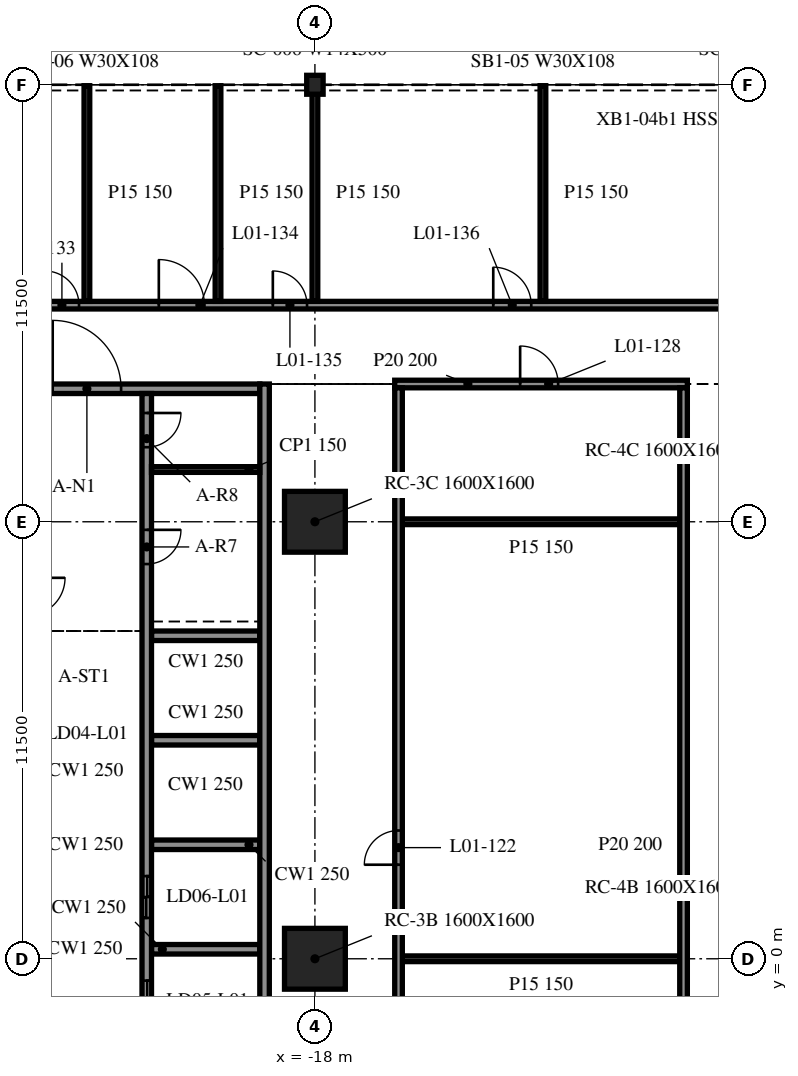
"""IFC4 building model, lengths in metres.
Left out: names, types, materials, properties, quantities, classifications, styles, units other than length and angle.
Written with IfcOpenShell. Run it as: python <this file> out.ifc"""

import sys

from ifc_helpers import new_model, si_unit, direction, frame, frame_2d, origin, origin_2d, place, context, subcontext, project, spatial, rectangle, i_section, extrude, element, fill, save


model = new_model("IFC4")
c1 = context("Model", 3, precision=1e-05, world=origin(), true_north=direction((0.0, 1.0)))
c2 = subcontext(c1, "Body", "Model", "MODEL_VIEW")
j1 = project(units=[si_unit("LENGTHUNIT", "METRE"), si_unit("PLANEANGLEUNIT", "RADIAN")], contexts=[c1])
p1 = place(None, origin())
s1 = spatial("IfcSite", under=j1, at=p1, CompositionType="ELEMENT")
p2 = place(p1, origin())
s2 = spatial("IfcBuilding", under=s1, at=p2, CompositionType="ELEMENT")
p3 = place(p2, frame((0.0, 0.0, 7.2)))
s3 = spatial("IfcBuildingStorey", under=s2, at=p3, CompositionType="ELEMENT", Elevation=7.2)
for number, where, z_axis, x_axis in (
    (1, (-18.0, 0.0, -0.34), (0.0, 0.0, 1.0), (1.0, 0.0, 0.0)),
    (2, (-18.0, 11.5, -0.34), (0.0, 0.0, 1.0), (1.0, 0.0, 0.0)),
):
    element("IfcColumn", number, at=place(p3, frame(where, z_axis=z_axis, x_axis=x_axis)), inside=s3, PredefinedType="COLUMN", context=c2, shape_type="SweptSolid", body=[
        extrude(rectangle(XDim=1.6, YDim=1.6, at=origin_2d()), origin(), (0.0, 0.0, 1.0), 4.3),
    ])
p4 = place(p3, frame((-18.0, 23.0, -0.34), z_axis=(0.0, 0.0, 1.0), x_axis=(1.0, 0.0, 0.0)))
e3 = element("IfcColumn", 3, at=p4, inside=s3, PredefinedType="COLUMN", context=c2, shape_type="SweptSolid", body=[
    extrude(i_section(OverallWidth=0.432, OverallDepth=0.498, WebThickness=0.056, FlangeThickness=0.089, at=origin_2d()), origin(), (0.0, 0.0, 1.0), 4.3),
])
p5 = place(p3, frame((-19.325, -9.125, 0.0), z_axis=(0.0, 0.0, 1.0), x_axis=(0.0, 1.0, 0.0)))
e4 = element("IfcWall", 4, at=p5, inside=s3, PredefinedType="SOLIDWALL", context=c2, shape_type="SweptSolid", body=[
    extrude(rectangle(XDim=24.25, YDim=0.25, at=frame_2d((12.125, 0.0))), origin(), (0.0, 0.0, 1.0), 3.96),
])
p6 = place(p3, frame((-28.55, 15.0, 0.0), z_axis=(0.0, 0.0, 1.0), x_axis=(1.0, 0.0, 0.0)))
e5 = element("IfcWall", 5, at=p6, inside=s3, PredefinedType="SOLIDWALL", context=c2, shape_type="SweptSolid", body=[
    extrude(rectangle(XDim=9.1, YDim=0.25, at=frame_2d((4.55, 0.0))), origin(), (0.0, 0.0, 1.0), 3.96),
])
p7 = place(p6, frame((3.65, 0.0, 0.0)))
e6 = element("IfcOpeningElement", 6, at=p7, cuts=e5, PredefinedType="OPENING", context=c2, shape_type="SweptSolid", body=[
    extrude(rectangle(XDim=1.8, YDim=2.1, at=frame_2d((0.9, 1.05))), frame((0.0, 0.135, 0.0), z_axis=(0.0, -1.0, 0.0), x_axis=(1.0, 0.0, 0.0)), (0.0, 0.0, 1.0), 0.27),
])
p8 = place(p3, frame((-22.425, 14.875, 0.0), z_axis=(0.0, 0.0, 1.0), x_axis=(0.0, -1.0, 0.0)))
e7 = element("IfcWall", 7, at=p8, inside=s3, PredefinedType="SOLIDWALL", context=c2, shape_type="SweptSolid", body=[
    extrude(rectangle(XDim=23.75, YDim=0.25, at=frame_2d((11.875, 0.0))), origin(), (0.0, 0.0, 1.0), 3.96),
])
p9 = place(p8, frame((15.45, 0.0, 0.0)))
e8 = element("IfcOpeningElement", 8, at=p9, cuts=e7, PredefinedType="OPENING", context=c2, shape_type="SweptSolid", body=[
    extrude(rectangle(XDim=1.1, YDim=2.1, at=frame_2d((0.55, 1.05))), frame((0.0, 0.135, 0.0), z_axis=(0.0, -1.0, 0.0), x_axis=(1.0, 0.0, 0.0)), (0.0, 0.0, 1.0), 0.27),
])
p10 = place(p8, frame((12.7, 0.0, 0.0)))
e9 = element("IfcOpeningElement", 9, at=p10, cuts=e7, PredefinedType="OPENING", context=c2, shape_type="SweptSolid", body=[
    extrude(rectangle(XDim=1.1, YDim=2.1, at=frame_2d((0.55, 1.05))), frame((0.0, 0.135, 0.0), z_axis=(0.0, -1.0, 0.0), x_axis=(1.0, 0.0, 0.0)), (0.0, 0.0, 1.0), 0.27),
])
p11 = place(p8, frame((22.337, 0.0, 0.0)))
e10 = element("IfcOpeningElement", 10, at=p11, cuts=e7, PredefinedType="OPENING", context=c2, shape_type="SweptSolid", body=[
    extrude(rectangle(XDim=0.9, YDim=2.1, at=frame_2d((0.45, 1.05))), frame((0.0, 0.135, 0.0), z_axis=(0.0, -1.0, 0.0), x_axis=(1.0, 0.0, 0.0)), (0.0, 0.0, 1.0), 0.27),
])
p12 = place(p8, frame((20.3, 0.0, 0.0)))
e11 = element("IfcOpeningElement", 11, at=p12, cuts=e7, PredefinedType="OPENING", context=c2, shape_type="SweptSolid", body=[
    extrude(rectangle(XDim=0.9, YDim=2.1, at=frame_2d((0.45, 1.05))), frame((0.0, 0.135, 0.0), z_axis=(0.0, -1.0, 0.0), x_axis=(1.0, 0.0, 0.0)), (0.0, 0.0, 1.0), 0.27),
])
p13 = place(p8, frame((18.262, 0.0, 0.0)))
e12 = element("IfcOpeningElement", 12, at=p13, cuts=e7, PredefinedType="OPENING", context=c2, shape_type="SweptSolid", body=[
    extrude(rectangle(XDim=0.9, YDim=2.1, at=frame_2d((0.45, 1.05))), frame((0.0, 0.135, 0.0), z_axis=(0.0, -1.0, 0.0), x_axis=(1.0, 0.0, 0.0)), (0.0, 0.0, 1.0), 0.27),
])
p14 = place(p8, frame((3.587, 0.0, 0.0)))
e13 = element("IfcOpeningElement", 13, at=p14, cuts=e7, PredefinedType="OPENING", context=c2, shape_type="SweptSolid", body=[
    extrude(rectangle(XDim=0.9, YDim=2.1, at=frame_2d((0.45, 1.05))), frame((0.0, 0.135, 0.0), z_axis=(0.0, -1.0, 0.0), x_axis=(1.0, 0.0, 0.0)), (0.0, 0.0, 1.0), 0.27),
])
p15 = place(p8, frame((0.512, 0.0, 0.0)))
e14 = element("IfcOpeningElement", 14, at=p15, cuts=e7, PredefinedType="OPENING", context=c2, shape_type="SweptSolid", body=[
    extrude(rectangle(XDim=0.9, YDim=2.1, at=frame_2d((0.45, 1.05))), frame((0.0, 0.135, 0.0), z_axis=(0.0, -1.0, 0.0), x_axis=(1.0, 0.0, 0.0)), (0.0, 0.0, 1.0), 0.27),
])
for number, where, z_axis, x_axis in (
    (15, (-22.3, 0.25, 0.0), (0.0, 0.0, 1.0), (1.0, 0.0, 0.0)),
    (16, (-22.3, 3.0, 0.0), (0.0, 0.0, 1.0), (1.0, 0.0, 0.0)),
    (17, (-22.3, 5.75, 0.0), (0.0, 0.0, 1.0), (1.0, 0.0, 0.0)),
    (18, (-22.3, 8.5, 0.0), (0.0, 0.0, 1.0), (1.0, 0.0, 0.0)),
):
    element("IfcWall", number, at=place(p3, frame(where, z_axis=z_axis, x_axis=x_axis)), inside=s3, PredefinedType="SOLIDWALL", context=c2, shape_type="SweptSolid", body=[
        extrude(rectangle(XDim=2.85, YDim=0.25, at=frame_2d((1.425, 0.0))), origin(), (0.0, 0.0, 1.0), 3.96),
    ])
p16 = place(p3, frame((-22.3, 12.875, 0.0), z_axis=(0.0, 0.0, 1.0), x_axis=(1.0, 0.0, 0.0)))
e19 = element("IfcWall", 19, at=p16, inside=s3, PredefinedType="PARTITIONING", context=c2, shape_type="SweptSolid", body=[
    extrude(rectangle(XDim=2.85, YDim=0.15, at=frame_2d((1.425, 0.0))), origin(), (0.0, 0.0, 1.0), 3.96),
])
for number, where, z_axis, x_axis in (
    (20, (-15.7, 0.0, 0.0), (0.0, 0.0, 1.0), (1.0, 0.0, 0.0)),
    (21, (-15.7, 11.5, 0.0), (0.0, 0.0, 1.0), (1.0, 0.0, 0.0)),
):
    element("IfcWall", number, at=place(p3, frame(where, z_axis=z_axis, x_axis=x_axis)), inside=s3, PredefinedType="PARTITIONING", context=c2, shape_type="SweptSolid", body=[
        extrude(rectangle(XDim=7.3, YDim=0.15, at=frame_2d((3.65, 0.0))), origin(), (0.0, 0.0, 1.0), 3.96),
    ])
p17 = place(p3, frame((-15.9, 15.125, 0.0), z_axis=(0.0, 0.0, 1.0), x_axis=(1.0, 0.0, 0.0)))
e22 = element("IfcWall", 22, at=p17, inside=s3, PredefinedType="PARTITIONING", context=c2, shape_type="SweptSolid", body=[
    extrude(rectangle(XDim=7.7, YDim=0.2, at=frame_2d((3.85, 0.0))), origin(), (0.0, 0.0, 1.0), 3.96),
])
p18 = place(p17, frame((3.3, 0.0, 0.0)))
e23 = element("IfcOpeningElement", 23, at=p18, cuts=e22, PredefinedType="OPENING", context=c2, shape_type="SweptSolid", body=[
    extrude(rectangle(XDim=1.0, YDim=2.1, at=frame_2d((0.5, 1.05))), frame((0.0, 0.11, 0.0), z_axis=(0.0, -1.0, 0.0), x_axis=(1.0, 0.0, 0.0)), (0.0, 0.0, 1.0), 0.22),
])
p19 = place(p3, frame((-47.807, 17.2, 0.0), z_axis=(0.0, 0.0, 1.0), x_axis=(1.0, 0.0, 0.0)))
e24 = element("IfcWall", 24, at=p19, inside=s3, PredefinedType="PARTITIONING", context=c2, shape_type="SweptSolid", body=[
    extrude(rectangle(XDim=95.615, YDim=0.2, at=frame_2d((47.807, 0.0))), origin(), (0.0, 0.0, 1.0), 3.96),
])
p20 = place(p19, frame((4.5, 0.0, 0.0)))
e25 = element("IfcOpeningElement", 25, at=p20, cuts=e24, PredefinedType="OPENING", context=c2, shape_type="SweptSolid", body=[
    extrude(rectangle(XDim=1.0, YDim=2.1, at=frame_2d((0.5, 1.05))), frame((0.0, 0.11, 0.0), z_axis=(0.0, -1.0, 0.0), x_axis=(1.0, 0.0, 0.0)), (0.0, 0.0, 1.0), 0.22),
])
p21 = place(p19, frame((10.9, 0.0, 0.0)))
e26 = element("IfcOpeningElement", 26, at=p21, cuts=e24, PredefinedType="OPENING", context=c2, shape_type="SweptSolid", body=[
    extrude(rectangle(XDim=1.0, YDim=2.1, at=frame_2d((0.5, 1.05))), frame((0.0, 0.11, 0.0), z_axis=(0.0, -1.0, 0.0), x_axis=(1.0, 0.0, 0.0)), (0.0, 0.0, 1.0), 0.22),
])
p22 = place(p19, frame((22.7, 0.0, 0.0)))
e27 = element("IfcOpeningElement", 27, at=p22, cuts=e24, PredefinedType="OPENING", context=c2, shape_type="SweptSolid", body=[
    extrude(rectangle(XDim=0.9, YDim=2.1, at=frame_2d((0.45, 1.05))), frame((0.0, 0.11, 0.0), z_axis=(0.0, -1.0, 0.0), x_axis=(1.0, 0.0, 0.0)), (0.0, 0.0, 1.0), 0.22),
])
p23 = place(p19, frame((25.7, 0.0, 0.0)))
e28 = element("IfcOpeningElement", 28, at=p23, cuts=e24, PredefinedType="OPENING", context=c2, shape_type="SweptSolid", body=[
    extrude(rectangle(XDim=1.2, YDim=2.1, at=frame_2d((0.6, 1.05))), frame((0.0, 0.11, 0.0), z_axis=(0.0, -1.0, 0.0), x_axis=(1.0, 0.0, 0.0)), (0.0, 0.0, 1.0), 0.22),
])
p24 = place(p19, frame((28.7, 0.0, 0.0)))
e29 = element("IfcOpeningElement", 29, at=p24, cuts=e24, PredefinedType="OPENING", context=c2, shape_type="SweptSolid", body=[
    extrude(rectangle(XDim=0.9, YDim=2.1, at=frame_2d((0.45, 1.05))), frame((0.0, 0.11, 0.0), z_axis=(0.0, -1.0, 0.0), x_axis=(1.0, 0.0, 0.0)), (0.0, 0.0, 1.0), 0.22),
])
p25 = place(p19, frame((34.5, 0.0, 0.0)))
e30 = element("IfcOpeningElement", 30, at=p25, cuts=e24, PredefinedType="OPENING", context=c2, shape_type="SweptSolid", body=[
    extrude(rectangle(XDim=1.0, YDim=2.1, at=frame_2d((0.5, 1.05))), frame((0.0, 0.11, 0.0), z_axis=(0.0, -1.0, 0.0), x_axis=(1.0, 0.0, 0.0)), (0.0, 0.0, 1.0), 0.22),
])
p26 = place(p19, frame((46.5, 0.0, 0.0)))
e31 = element("IfcOpeningElement", 31, at=p26, cuts=e24, PredefinedType="OPENING", context=c2, shape_type="SweptSolid", body=[
    extrude(rectangle(XDim=1.0, YDim=2.1, at=frame_2d((0.5, 1.05))), frame((0.0, 0.11, 0.0), z_axis=(0.0, -1.0, 0.0), x_axis=(1.0, 0.0, 0.0)), (0.0, 0.0, 1.0), 0.22),
])
p27 = place(p19, frame((48.1, 0.0, 0.0)))
e32 = element("IfcOpeningElement", 32, at=p27, cuts=e24, PredefinedType="OPENING", context=c2, shape_type="SweptSolid", body=[
    extrude(rectangle(XDim=0.9, YDim=2.1, at=frame_2d((0.45, 1.05))), frame((0.0, 0.11, 0.0), z_axis=(0.0, -1.0, 0.0), x_axis=(1.0, 0.0, 0.0)), (0.0, 0.0, 1.0), 0.22),
])
p28 = place(p19, frame((51.5, 0.0, 0.0)))
e33 = element("IfcOpeningElement", 33, at=p28, cuts=e24, PredefinedType="OPENING", context=c2, shape_type="SweptSolid", body=[
    extrude(rectangle(XDim=1.2, YDim=2.1, at=frame_2d((0.6, 1.05))), frame((0.0, 0.11, 0.0), z_axis=(0.0, -1.0, 0.0), x_axis=(1.0, 0.0, 0.0)), (0.0, 0.0, 1.0), 0.22),
])
p29 = place(p19, frame((54.1, 0.0, 0.0)))
e34 = element("IfcOpeningElement", 34, at=p29, cuts=e24, PredefinedType="OPENING", context=c2, shape_type="SweptSolid", body=[
    extrude(rectangle(XDim=0.9, YDim=2.1, at=frame_2d((0.45, 1.05))), frame((0.0, 0.11, 0.0), z_axis=(0.0, -1.0, 0.0), x_axis=(1.0, 0.0, 0.0)), (0.0, 0.0, 1.0), 0.22),
])
p30 = place(p19, frame((60.1, 0.0, 0.0)))
e35 = element("IfcOpeningElement", 35, at=p30, cuts=e24, PredefinedType="OPENING", context=c2, shape_type="SweptSolid", body=[
    extrude(rectangle(XDim=1.0, YDim=2.1, at=frame_2d((0.5, 1.05))), frame((0.0, 0.11, 0.0), z_axis=(0.0, -1.0, 0.0), x_axis=(1.0, 0.0, 0.0)), (0.0, 0.0, 1.0), 0.22),
])
p31 = place(p19, frame((72.1, 0.0, 0.0)))
e36 = element("IfcOpeningElement", 36, at=p31, cuts=e24, PredefinedType="OPENING", context=c2, shape_type="SweptSolid", body=[
    extrude(rectangle(XDim=1.0, YDim=2.1, at=frame_2d((0.5, 1.05))), frame((0.0, 0.11, 0.0), z_axis=(0.0, -1.0, 0.0), x_axis=(1.0, 0.0, 0.0)), (0.0, 0.0, 1.0), 0.22),
])
p32 = place(p19, frame((75.5, 0.0, 0.0)))
e37 = element("IfcOpeningElement", 37, at=p32, cuts=e24, PredefinedType="OPENING", context=c2, shape_type="SweptSolid", body=[
    extrude(rectangle(XDim=0.9, YDim=2.1, at=frame_2d((0.45, 1.05))), frame((0.0, 0.11, 0.0), z_axis=(0.0, -1.0, 0.0), x_axis=(1.0, 0.0, 0.0)), (0.0, 0.0, 1.0), 0.22),
])
p33 = place(p19, frame((78.1, 0.0, 0.0)))
e38 = element("IfcOpeningElement", 38, at=p33, cuts=e24, PredefinedType="OPENING", context=c2, shape_type="SweptSolid", body=[
    extrude(rectangle(XDim=1.2, YDim=2.1, at=frame_2d((0.6, 1.05))), frame((0.0, 0.11, 0.0), z_axis=(0.0, -1.0, 0.0), x_axis=(1.0, 0.0, 0.0)), (0.0, 0.0, 1.0), 0.22),
])
p34 = place(p19, frame((84.1, 0.0, 0.0)))
e39 = element("IfcOpeningElement", 39, at=p34, cuts=e24, PredefinedType="OPENING", context=c2, shape_type="SweptSolid", body=[
    extrude(rectangle(XDim=0.9, YDim=2.1, at=frame_2d((0.45, 1.05))), frame((0.0, 0.11, 0.0), z_axis=(0.0, -1.0, 0.0), x_axis=(1.0, 0.0, 0.0)), (0.0, 0.0, 1.0), 0.22),
])
for number, where, z_axis, x_axis in (
    (40, (-24.0, 17.3, 0.0), (0.0, 0.0, 1.0), (0.0, 1.0, 0.0)),
    (41, (-20.55, 17.3, 0.0), (0.0, 0.0, 1.0), (0.0, 1.0, 0.0)),
    (42, (-18.0, 17.3, 0.0), (0.0, 0.0, 1.0), (0.0, 1.0, 0.0)),
):
    element("IfcWall", number, at=place(p3, frame(where, z_axis=z_axis, x_axis=x_axis)), inside=s3, PredefinedType="PARTITIONING", context=c2, shape_type="SweptSolid", body=[
        extrude(rectangle(XDim=5.675, YDim=0.15, at=frame_2d((2.837, 0.0))), origin(), (0.0, 0.0, 1.0), 3.96),
    ])
p35 = place(p3, frame((-15.8, -9.025, 0.0), z_axis=(0.0, 0.0, 1.0), x_axis=(0.0, 1.0, 0.0)))
e43 = element("IfcWall", 43, at=p35, inside=s3, PredefinedType="PARTITIONING", context=c2, shape_type="SweptSolid", body=[
    extrude(rectangle(XDim=24.05, YDim=0.2, at=frame_2d((12.025, 0.0))), origin(), (0.0, 0.0, 1.0), 3.96),
])
p36 = place(p35, frame((11.5, 0.0, 0.0)))
e44 = element("IfcOpeningElement", 44, at=p36, cuts=e43, PredefinedType="OPENING", context=c2, shape_type="SweptSolid", body=[
    extrude(rectangle(XDim=0.9, YDim=2.1, at=frame_2d((0.45, 1.05))), frame((0.0, 0.11, 0.0), z_axis=(0.0, -1.0, 0.0), x_axis=(1.0, 0.0, 0.0)), (0.0, 0.0, 1.0), 0.22),
])
p37 = place(p3, frame((-12.0, 17.3, 0.0), z_axis=(0.0, 0.0, 1.0), x_axis=(0.0, 1.0, 0.0)))
e45 = element("IfcWall", 45, at=p37, inside=s3, PredefinedType="PARTITIONING", context=c2, shape_type="SweptSolid", body=[
    extrude(rectangle(XDim=5.675, YDim=0.15, at=frame_2d((2.837, 0.0))), origin(), (0.0, 0.0, 1.0), 3.96),
])
p38 = place(p3, frame((-8.3, -9.025, 0.0), z_axis=(0.0, 0.0, 1.0), x_axis=(0.0, 1.0, 0.0)))
e46 = element("IfcWall", 46, at=p38, inside=s3, PredefinedType="PARTITIONING", context=c2, shape_type="SweptSolid", body=[
    extrude(rectangle(XDim=24.05, YDim=0.2, at=frame_2d((12.025, 0.0))), origin(), (0.0, 0.0, 1.0), 3.96),
])
p39 = place(p7, origin())
e47 = element("IfcDoor", 47, at=p39, inside=s3, OperationType="DOUBLE_DOOR_SINGLE_SWING", PredefinedType="DOOR", context=c2, shape_type="SweptSolid", body=[
    extrude(rectangle(XDim=1.8, YDim=2.1, at=frame_2d((0.9, 1.05))), frame((0.0, 0.025, 0.0), z_axis=(0.0, -1.0, 0.0), x_axis=(1.0, 0.0, 0.0)), (0.0, 0.0, 1.0), 0.05),
])
fill(e6, e47)
p40 = place(p9, origin())
e48 = element("IfcDoor", 48, at=p40, inside=s3, OperationType="DOUBLE_DOOR_SLIDING", PredefinedType="DOOR", context=c2, shape_type="SweptSolid", body=[
    extrude(rectangle(XDim=1.1, YDim=2.1, at=frame_2d((0.55, 1.05))), frame((0.0, 0.025, 0.0), z_axis=(0.0, -1.0, 0.0), x_axis=(1.0, 0.0, 0.0)), (0.0, 0.0, 1.0), 0.05),
])
fill(e8, e48)
p41 = place(p10, origin())
e49 = element("IfcDoor", 49, at=p41, inside=s3, OperationType="DOUBLE_DOOR_SLIDING", PredefinedType="DOOR", context=c2, shape_type="SweptSolid", body=[
    extrude(rectangle(XDim=1.1, YDim=2.1, at=frame_2d((0.55, 1.05))), frame((0.0, 0.025, 0.0), z_axis=(0.0, -1.0, 0.0), x_axis=(1.0, 0.0, 0.0)), (0.0, 0.0, 1.0), 0.05),
])
fill(e9, e49)
p42 = place(p14, origin())
e50 = element("IfcDoor", 50, at=p42, inside=s3, OperationType="SINGLE_SWING_LEFT", PredefinedType="DOOR", context=c2, shape_type="SweptSolid", body=[
    extrude(rectangle(XDim=0.9, YDim=2.1, at=frame_2d((0.45, 1.05))), frame((0.0, 0.025, 0.0), z_axis=(0.0, -1.0, 0.0), x_axis=(1.0, 0.0, 0.0)), (0.0, 0.0, 1.0), 0.05),
])
fill(e13, e50)
p43 = place(p15, origin())
e51 = element("IfcDoor", 51, at=p43, inside=s3, OperationType="SINGLE_SWING_RIGHT", PredefinedType="DOOR", context=c2, shape_type="SweptSolid", body=[
    extrude(rectangle(XDim=0.9, YDim=2.1, at=frame_2d((0.45, 1.05))), frame((0.0, 0.025, 0.0), z_axis=(0.0, -1.0, 0.0), x_axis=(1.0, 0.0, 0.0)), (0.0, 0.0, 1.0), 0.05),
])
fill(e14, e51)
p44 = place(p36, origin())
e52 = element("IfcDoor", 52, at=p44, inside=s3, OperationType="SINGLE_SWING_RIGHT", PredefinedType="DOOR", context=c2, shape_type="SweptSolid", body=[
    extrude(rectangle(XDim=0.9, YDim=2.1, at=frame_2d((0.45, 1.05))), frame((0.0, 0.025, 0.0), z_axis=(0.0, -1.0, 0.0), x_axis=(1.0, 0.0, 0.0)), (0.0, 0.0, 1.0), 0.05),
])
fill(e44, e52)
p45 = place(p18, origin())
e53 = element("IfcDoor", 53, at=p45, inside=s3, OperationType="SINGLE_SWING_RIGHT", PredefinedType="DOOR", context=c2, shape_type="SweptSolid", body=[
    extrude(rectangle(XDim=1.0, YDim=2.1, at=frame_2d((0.5, 1.05))), frame((0.0, 0.025, 0.0), z_axis=(0.0, -1.0, 0.0), x_axis=(1.0, 0.0, 0.0)), (0.0, 0.0, 1.0), 0.05),
])
fill(e23, e53)
p46 = place(p22, origin())
e54 = element("IfcDoor", 54, at=p46, inside=s3, OperationType="SINGLE_SWING_LEFT", PredefinedType="DOOR", context=c2, shape_type="SweptSolid", body=[
    extrude(rectangle(XDim=0.9, YDim=2.1, at=frame_2d((0.45, 1.05))), frame((0.0, 0.025, 0.0), z_axis=(0.0, -1.0, 0.0), x_axis=(1.0, 0.0, 0.0)), (0.0, 0.0, 1.0), 0.05),
])
fill(e27, e54)
p47 = place(p23, origin())
e55 = element("IfcDoor", 55, at=p47, inside=s3, OperationType="SINGLE_SWING_LEFT", PredefinedType="DOOR", context=c2, shape_type="SweptSolid", body=[
    extrude(rectangle(XDim=1.2, YDim=2.1, at=frame_2d((0.6, 1.05))), frame((0.0, 0.025, 0.0), z_axis=(0.0, -1.0, 0.0), x_axis=(1.0, 0.0, 0.0)), (0.0, 0.0, 1.0), 0.05),
])
fill(e28, e55)
p48 = place(p24, origin())
e56 = element("IfcDoor", 56, at=p48, inside=s3, OperationType="SINGLE_SWING_LEFT", PredefinedType="DOOR", context=c2, shape_type="SweptSolid", body=[
    extrude(rectangle(XDim=0.9, YDim=2.1, at=frame_2d((0.45, 1.05))), frame((0.0, 0.025, 0.0), z_axis=(0.0, -1.0, 0.0), x_axis=(1.0, 0.0, 0.0)), (0.0, 0.0, 1.0), 0.05),
])
fill(e29, e56)
p49 = place(p25, origin())
e57 = element("IfcDoor", 57, at=p49, inside=s3, OperationType="SINGLE_SWING_LEFT", PredefinedType="DOOR", context=c2, shape_type="SweptSolid", body=[
    extrude(rectangle(XDim=1.0, YDim=2.1, at=frame_2d((0.5, 1.05))), frame((0.0, 0.025, 0.0), z_axis=(0.0, -1.0, 0.0), x_axis=(1.0, 0.0, 0.0)), (0.0, 0.0, 1.0), 0.05),
])
fill(e30, e57)
save(model, sys.argv[1])
